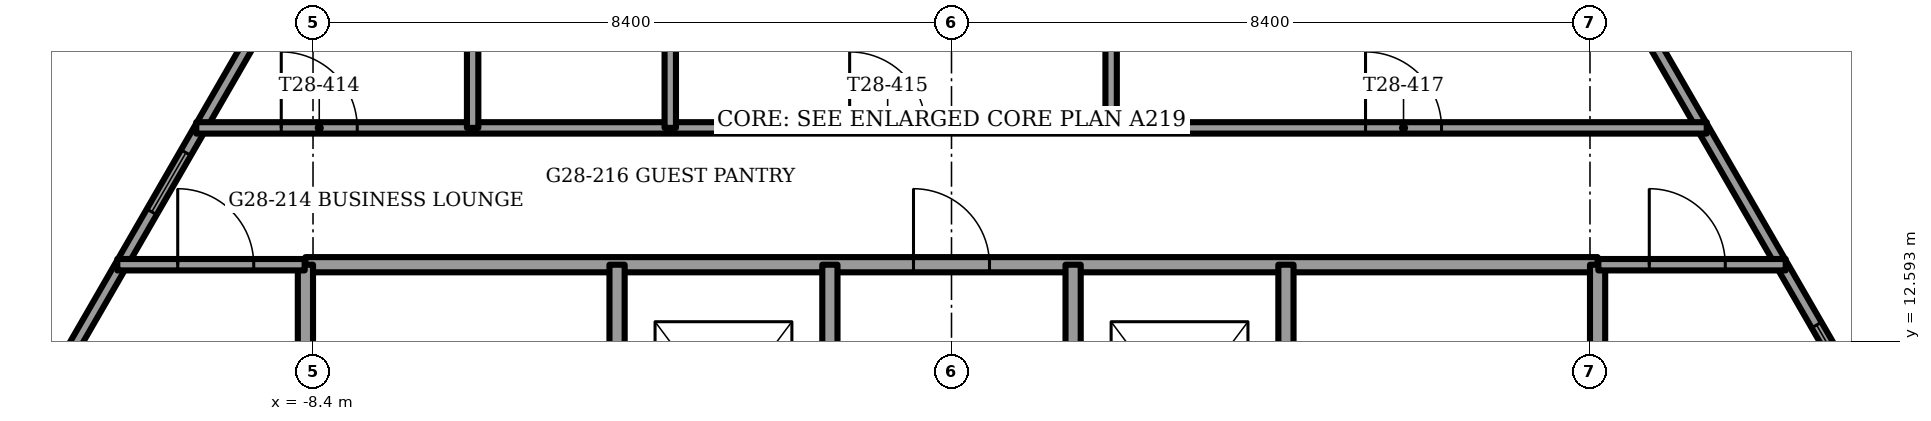
"""IFC4 building model, lengths in metres.
Left out: names, types, materials, properties, quantities, classifications, styles, units other than length and angle.
Written with IfcOpenShell. Run it as: python <this file> out.ifc"""

import sys

from ifc_helpers import new_model, si_unit, direction, frame, frame_2d, origin, place, context, subcontext, project, spatial, rectangle, extrude, element, fill, save


model = new_model("IFC4")
c1 = context("Model", 3, precision=1e-05, world=origin(), true_north=direction((0.0, 1.0)))
c2 = subcontext(c1, "Body", "Model", "MODEL_VIEW")
j1 = project(units=[si_unit("LENGTHUNIT", "METRE"), si_unit("PLANEANGLEUNIT", "RADIAN")], contexts=[c1])
p1 = place(None, origin())
s1 = spatial("IfcSite", under=j1, at=p1, CompositionType="ELEMENT")
p2 = place(p1, origin())
s2 = spatial("IfcBuilding", under=s1, at=p2, CompositionType="ELEMENT")
p3 = place(p2, frame((0.0, 0.0, 116.0)))
s3 = spatial("IfcBuildingStorey", under=s2, at=p3, CompositionType="ELEMENT", Elevation=116.0)
for number, where, z_axis, x_axis in (
    (1, (-11.017, 19.286, 0.0), (0.0, 0.0, 1.0), (-0.5, -0.866, 0.0)),
    (2, (14.376, 13.469, 0.0), (0.0, 0.0, 1.0), (-0.5, 0.866, 0.0)),
):
    element("IfcWall", number, at=place(p3, frame(where, z_axis=z_axis, x_axis=x_axis)), inside=s3, PredefinedType="PARAPET", context=c2, shape_type="SweptSolid", body=[
        extrude(rectangle(XDim=6.717, YDim=0.9, at=frame_2d((3.358, 0.0))), origin(), (0.0, 0.0, 1.0), 1.1),
    ])
p4 = place(p3, frame((-7.925, 18.792, 0.0), z_axis=(0.0, 0.0, 1.0), x_axis=(-0.499994842654, -0.866028381359, 0.0)))
e3 = element("IfcWall", 3, at=p4, inside=s3, PredefinedType="SOLIDWALL", context=c2, shape_type="SweptSolid", body=[
    extrude(rectangle(XDim=21.853, YDim=0.15, at=frame_2d((10.927, 0.0))), origin(), (0.0, 0.0, 1.0), 3.45),
])
p5 = place(p4, frame((4.293, 0.0, 0.15)))
e4 = element("IfcOpeningElement", 4, at=p5, cuts=e3, PredefinedType="OPENING", context=c2, shape_type="SweptSolid", body=[
    extrude(rectangle(XDim=0.9, YDim=2.85, at=frame_2d((0.45, 1.425))), frame((0.0, 0.075, 0.0), z_axis=(0.0, -1.0, 0.0), x_axis=(1.0, 0.0, 0.0)), (0.0, 0.0, 1.0), 0.15),
])
p6 = place(p4, frame((8.412, 0.0, 0.15)))
e5 = element("IfcOpeningElement", 5, at=p6, cuts=e3, PredefinedType="OPENING", context=c2, shape_type="SweptSolid", body=[
    extrude(rectangle(XDim=0.9, YDim=2.85, at=frame_2d((0.45, 1.425))), frame((0.0, 0.075, 0.0), z_axis=(0.0, -1.0, 0.0), x_axis=(1.0, 0.0, 0.0)), (0.0, 0.0, 1.0), 0.15),
])
p7 = place(p4, frame((12.612, 0.0, 0.15)))
e6 = element("IfcOpeningElement", 6, at=p7, cuts=e3, PredefinedType="OPENING", context=c2, shape_type="SweptSolid", body=[
    extrude(rectangle(XDim=1.7, YDim=2.85, at=frame_2d((0.85, 1.425))), frame((0.0, 0.075, 0.0), z_axis=(0.0, -1.0, 0.0), x_axis=(1.0, 0.0, 0.0)), (0.0, 0.0, 1.0), 0.15),
])
p8 = place(p4, frame((14.712, 0.0, 0.15)))
e7 = element("IfcOpeningElement", 7, at=p8, cuts=e3, PredefinedType="OPENING", context=c2, shape_type="SweptSolid", body=[
    extrude(rectangle(XDim=1.5, YDim=2.85, at=frame_2d((0.75, 1.425))), frame((0.0, 0.075, 0.0), z_axis=(0.0, -1.0, 0.0), x_axis=(1.0, 0.0, 0.0)), (0.0, 0.0, 1.0), 0.15),
])
p9 = place(p4, frame((16.812, 0.0, 0.15)))
e8 = element("IfcOpeningElement", 8, at=p9, cuts=e3, PredefinedType="OPENING", context=c2, shape_type="SweptSolid", body=[
    extrude(rectangle(XDim=1.7, YDim=2.85, at=frame_2d((0.85, 1.425))), frame((0.0, 0.075, 0.0), z_axis=(0.0, -1.0, 0.0), x_axis=(1.0, 0.0, 0.0)), (0.0, 0.0, 1.0), 0.15),
])
p10 = place(p4, frame((18.912, 0.0, 0.15)))
e9 = element("IfcOpeningElement", 9, at=p10, cuts=e3, PredefinedType="OPENING", context=c2, shape_type="SweptSolid", body=[
    extrude(rectangle(XDim=1.5, YDim=2.85, at=frame_2d((0.75, 1.425))), frame((0.0, 0.075, 0.0), z_axis=(0.0, -1.0, 0.0), x_axis=(1.0, 0.0, 0.0)), (0.0, 0.0, 1.0), 0.15),
])
p11 = place(p4, frame((1.022, 0.0, 0.15)))
e10 = element("IfcOpeningElement", 10, at=p11, cuts=e3, PredefinedType="OPENING", context=c2, shape_type="SweptSolid", body=[
    extrude(rectangle(XDim=1.7, YDim=2.73, at=frame_2d((0.85, 1.365))), frame((0.0, 0.075, 0.0), z_axis=(0.0, -1.0, 0.0), x_axis=(1.0, 0.0, 0.0)), (0.0, 0.0, 1.0), 0.15),
])
p12 = place(p3, frame((18.852, -0.133, 0.0), z_axis=(0.0, 0.0, 1.0), x_axis=(-0.499994842654, 0.866028381359, 0.0)))
e11 = element("IfcWall", 11, at=p12, inside=s3, PredefinedType="SOLIDWALL", context=c2, shape_type="SweptSolid", body=[
    extrude(rectangle(XDim=21.853, YDim=0.15, at=frame_2d((10.927, 0.0))), origin(), (0.0, 0.0, 1.0), 3.45),
])
p13 = place(p12, frame((1.441, 0.0, 0.15)))
e12 = element("IfcOpeningElement", 12, at=p13, cuts=e11, PredefinedType="OPENING", context=c2, shape_type="SweptSolid", body=[
    extrude(rectangle(XDim=1.7, YDim=2.85, at=frame_2d((0.85, 1.425))), frame((0.0, 0.075, 0.0), z_axis=(0.0, -1.0, 0.0), x_axis=(1.0, 0.0, 0.0)), (0.0, 0.0, 1.0), 0.15),
])
p14 = place(p12, frame((3.541, 0.0, 0.15)))
e13 = element("IfcOpeningElement", 13, at=p14, cuts=e11, PredefinedType="OPENING", context=c2, shape_type="SweptSolid", body=[
    extrude(rectangle(XDim=1.5, YDim=2.85, at=frame_2d((0.75, 1.425))), frame((0.0, 0.075, 0.0), z_axis=(0.0, -1.0, 0.0), x_axis=(1.0, 0.0, 0.0)), (0.0, 0.0, 1.0), 0.15),
])
p15 = place(p12, frame((5.641, 0.0, 0.15)))
e14 = element("IfcOpeningElement", 14, at=p15, cuts=e11, PredefinedType="OPENING", context=c2, shape_type="SweptSolid", body=[
    extrude(rectangle(XDim=1.7, YDim=2.85, at=frame_2d((0.85, 1.425))), frame((0.0, 0.075, 0.0), z_axis=(0.0, -1.0, 0.0), x_axis=(1.0, 0.0, 0.0)), (0.0, 0.0, 1.0), 0.15),
])
p16 = place(p12, frame((7.741, 0.0, 0.15)))
e15 = element("IfcOpeningElement", 15, at=p16, cuts=e11, PredefinedType="OPENING", context=c2, shape_type="SweptSolid", body=[
    extrude(rectangle(XDim=1.5, YDim=2.85, at=frame_2d((0.75, 1.425))), frame((0.0, 0.075, 0.0), z_axis=(0.0, -1.0, 0.0), x_axis=(1.0, 0.0, 0.0)), (0.0, 0.0, 1.0), 0.15),
])
p17 = place(p12, frame((10.531, 0.0, 0.15)))
e16 = element("IfcOpeningElement", 16, at=p17, cuts=e11, PredefinedType="OPENING", context=c2, shape_type="SweptSolid", body=[
    extrude(rectangle(XDim=0.9, YDim=2.85, at=frame_2d((0.45, 1.425))), frame((0.0, 0.075, 0.0), z_axis=(0.0, -1.0, 0.0), x_axis=(1.0, 0.0, 0.0)), (0.0, 0.0, 1.0), 0.15),
])
p18 = place(p12, frame((14.041, 0.0, 0.15)))
e17 = element("IfcOpeningElement", 17, at=p18, cuts=e11, PredefinedType="OPENING", context=c2, shape_type="SweptSolid", body=[
    extrude(rectangle(XDim=0.9, YDim=2.85, at=frame_2d((0.45, 1.425))), frame((0.0, 0.075, 0.0), z_axis=(0.0, -1.0, 0.0), x_axis=(1.0, 0.0, 0.0)), (0.0, 0.0, 1.0), 0.15),
])
p19 = place(p12, frame((19.132, 0.0, 0.15)))
e18 = element("IfcOpeningElement", 18, at=p19, cuts=e11, PredefinedType="OPENING", context=c2, shape_type="SweptSolid", body=[
    extrude(rectangle(XDim=1.7, YDim=2.73, at=frame_2d((0.85, 1.365))), frame((0.0, 0.075, 0.0), z_axis=(0.0, -1.0, 0.0), x_axis=(1.0, 0.0, 0.0)), (0.0, 0.0, 1.0), 0.15),
])
p20 = place(p3, frame((-8.5, 13.6, 0.0), z_axis=(0.0, 0.0, 1.0), x_axis=(1.0, 0.0, 0.0)))
e19 = element("IfcWall", 19, at=p20, inside=s3, PredefinedType="PARTITIONING", context=c2, shape_type="SweptSolid", body=[
    extrude(rectangle(XDim=17.0, YDim=0.2, at=frame_2d((8.5, 0.0))), origin(), (0.0, 0.0, 1.0), 3.45),
])
p21 = place(p20, frame((8.0, 0.0, 0.0)))
e20 = element("IfcOpeningElement", 20, at=p21, cuts=e19, PredefinedType="OPENING", context=c2, shape_type="SweptSolid", body=[
    extrude(rectangle(XDim=1.0, YDim=2.1, at=frame_2d((0.5, 1.05))), frame((0.0, 0.1, 0.0), z_axis=(0.0, -1.0, 0.0), x_axis=(1.0, 0.0, 0.0)), (0.0, 0.0, 1.0), 0.2),
])
p22 = place(p3, frame((-8.5, 9.7, 0.0), z_axis=(0.0, 0.0, 1.0), x_axis=(0.0, 1.0, 0.0)))
e21 = element("IfcWall", 21, at=p22, inside=s3, PredefinedType="PARTITIONING", context=c2, shape_type="SweptSolid", body=[
    extrude(rectangle(XDim=3.9, YDim=0.2, at=frame_2d((1.95, 0.0))), origin(), (0.0, 0.0, 1.0), 3.45),
])
p23 = place(p22, frame((1.35, 0.0, 0.0)))
e22 = element("IfcOpeningElement", 22, at=p23, cuts=e21, PredefinedType="OPENING", context=c2, shape_type="SweptSolid", body=[
    extrude(rectangle(XDim=1.2, YDim=2.1, at=frame_2d((0.6, 1.05))), frame((0.0, 0.1, 0.0), z_axis=(0.0, -1.0, 0.0), x_axis=(1.0, 0.0, 0.0)), (0.0, 0.0, 1.0), 0.2),
])
p24 = place(p3, frame((8.5, 9.7, 0.0), z_axis=(0.0, 0.0, 1.0), x_axis=(0.0, 1.0, 0.0)))
e23 = element("IfcWall", 23, at=p24, inside=s3, PredefinedType="PARTITIONING", context=c2, shape_type="SweptSolid", body=[
    extrude(rectangle(XDim=3.9, YDim=0.2, at=frame_2d((1.95, 0.0))), origin(), (0.0, 0.0, 1.0), 3.45),
])
p25 = place(p24, frame((1.35, 0.0, 0.0)))
e24 = element("IfcOpeningElement", 24, at=p25, cuts=e23, PredefinedType="OPENING", context=c2, shape_type="SweptSolid", body=[
    extrude(rectangle(XDim=1.2, YDim=2.1, at=frame_2d((0.6, 1.05))), frame((0.0, 0.1, 0.0), z_axis=(0.0, -1.0, 0.0), x_axis=(1.0, 0.0, 0.0)), (0.0, 0.0, 1.0), 0.2),
])
p26 = place(p3, frame((-4.4, 9.7, 0.0), z_axis=(0.0, 0.0, 1.0), x_axis=(0.0, 1.0, 0.0)))
e25 = element("IfcWall", 25, at=p26, inside=s3, PredefinedType="PARTITIONING", context=c2, shape_type="SweptSolid", body=[
    extrude(rectangle(XDim=3.9, YDim=0.2, at=frame_2d((1.95, 0.0))), origin(), (0.0, 0.0, 1.0), 3.45),
])
p27 = place(p26, frame((1.35, 0.0, 0.0)))
e26 = element("IfcOpeningElement", 26, at=p27, cuts=e25, PredefinedType="OPENING", context=c2, shape_type="SweptSolid", body=[
    extrude(rectangle(XDim=1.2, YDim=2.1, at=frame_2d((0.6, 1.05))), frame((0.0, 0.1, 0.0), z_axis=(0.0, -1.0, 0.0), x_axis=(1.0, 0.0, 0.0)), (0.0, 0.0, 1.0), 0.2),
])
p28 = place(p3, frame((4.4, 9.7, 0.0), z_axis=(0.0, 0.0, 1.0), x_axis=(0.0, 1.0, 0.0)))
e27 = element("IfcWall", 27, at=p28, inside=s3, PredefinedType="PARTITIONING", context=c2, shape_type="SweptSolid", body=[
    extrude(rectangle(XDim=3.9, YDim=0.2, at=frame_2d((1.95, 0.0))), origin(), (0.0, 0.0, 1.0), 3.45),
])
p29 = place(p28, frame((1.35, 0.0, 0.0)))
e28 = element("IfcOpeningElement", 28, at=p29, cuts=e27, PredefinedType="OPENING", context=c2, shape_type="SweptSolid", body=[
    extrude(rectangle(XDim=1.2, YDim=2.1, at=frame_2d((0.6, 1.05))), frame((0.0, 0.1, 0.0), z_axis=(0.0, -1.0, 0.0), x_axis=(1.0, 0.0, 0.0)), (0.0, 0.0, 1.0), 0.2),
])
for number, where, z_axis, x_axis in (
    (29, (-1.6, 9.7, 0.0), (0.0, 0.0, 1.0), (0.0, 1.0, 0.0)),
    (30, (1.6, 9.7, 0.0), (0.0, 0.0, 1.0), (0.0, 1.0, 0.0)),
):
    element("IfcWall", number, at=place(p3, frame(where, z_axis=z_axis, x_axis=x_axis)), inside=s3, PredefinedType="PARTITIONING", context=c2, shape_type="SweptSolid", body=[
        extrude(rectangle(XDim=3.9, YDim=0.2, at=frame_2d((1.95, 0.0))), origin(), (0.0, 0.0, 1.0), 3.45),
    ])
p30 = place(p3, frame((-10.975, 13.6, 0.0), z_axis=(0.0, 0.0, 1.0), x_axis=(1.0, 0.0, 0.0)))
e31 = element("IfcWall", 31, at=p30, inside=s3, PredefinedType="PARTITIONING", context=c2, shape_type="SweptSolid", body=[
    extrude(rectangle(XDim=2.465, YDim=0.15, at=frame_2d((1.232, 0.0))), origin(), (0.0, 0.0, 1.0), 3.45),
])
p31 = place(p30, frame((0.795, 0.0, 0.0)))
e32 = element("IfcOpeningElement", 32, at=p31, cuts=e31, PredefinedType="OPENING", context=c2, shape_type="SweptSolid", body=[
    extrude(rectangle(XDim=1.0, YDim=2.1, at=frame_2d((0.5, 1.05))), frame((0.0, 0.075, 0.0), z_axis=(0.0, -1.0, 0.0), x_axis=(1.0, 0.0, 0.0)), (0.0, 0.0, 1.0), 0.15),
])
p32 = place(p3, frame((8.51, 13.6, 0.0), z_axis=(0.0, 0.0, 1.0), x_axis=(1.0, 0.0, 0.0)))
e33 = element("IfcWall", 33, at=p32, inside=s3, PredefinedType="PARTITIONING", context=c2, shape_type="SweptSolid", body=[
    extrude(rectangle(XDim=2.465, YDim=0.15, at=frame_2d((1.232, 0.0))), origin(), (0.0, 0.0, 1.0), 3.45),
])
p33 = place(p32, frame((0.67, 0.0, 0.0)))
e34 = element("IfcOpeningElement", 34, at=p33, cuts=e33, PredefinedType="OPENING", context=c2, shape_type="SweptSolid", body=[
    extrude(rectangle(XDim=1.0, YDim=2.1, at=frame_2d((0.5, 1.05))), frame((0.0, 0.075, 0.0), z_axis=(0.0, -1.0, 0.0), x_axis=(1.0, 0.0, 0.0)), (0.0, 0.0, 1.0), 0.15),
])
p34 = place(p3, frame((-9.936, 15.4, 0.0), z_axis=(0.0, 0.0, 1.0), x_axis=(1.0, 0.0, 0.0)))
e35 = element("IfcWall", 35, at=p34, inside=s3, PredefinedType="PARTITIONING", context=c2, shape_type="SweptSolid", body=[
    extrude(rectangle(XDim=19.872, YDim=0.15, at=frame_2d((9.936, 0.0))), origin(), (0.0, 0.0, 1.0), 3.45),
])
p35 = place(p34, frame((1.118, 0.0, 0.0)))
e36 = element("IfcOpeningElement", 36, at=p35, cuts=e35, PredefinedType="OPENING", context=c2, shape_type="SweptSolid", body=[
    extrude(rectangle(XDim=1.0, YDim=2.1, at=frame_2d((0.5, 1.05))), frame((0.0, 0.075, 0.0), z_axis=(0.0, -1.0, 0.0), x_axis=(1.0, 0.0, 0.0)), (0.0, 0.0, 1.0), 0.15),
])
p36 = place(p34, frame((8.596, 0.0, 0.0)))
e37 = element("IfcOpeningElement", 37, at=p36, cuts=e35, PredefinedType="OPENING", context=c2, shape_type="SweptSolid", body=[
    extrude(rectangle(XDim=1.0, YDim=2.1, at=frame_2d((0.5, 1.05))), frame((0.0, 0.075, 0.0), z_axis=(0.0, -1.0, 0.0), x_axis=(1.0, 0.0, 0.0)), (0.0, 0.0, 1.0), 0.15),
])
p37 = place(p34, frame((15.383, 0.0, 0.0)))
e38 = element("IfcOpeningElement", 38, at=p37, cuts=e35, PredefinedType="OPENING", context=c2, shape_type="SweptSolid", body=[
    extrude(rectangle(XDim=1.0, YDim=2.1, at=frame_2d((0.5, 1.05))), frame((0.0, 0.075, 0.0), z_axis=(0.0, -1.0, 0.0), x_axis=(1.0, 0.0, 0.0)), (0.0, 0.0, 1.0), 0.15),
])
p38 = place(p3, frame((2.1, 15.4, 0.0), z_axis=(0.0, 0.0, 1.0), x_axis=(0.0, 1.0, 0.0)))
e39 = element("IfcWall", 39, at=p38, inside=s3, PredefinedType="PARTITIONING", context=c2, shape_type="SweptSolid", body=[
    extrude(rectangle(XDim=3.97, YDim=0.15, at=frame_2d((1.985, 0.0))), origin(), (0.0, 0.0, 1.0), 3.45),
])
p39 = place(p3, frame((-3.7, 15.4, 0.0), z_axis=(0.0, 0.0, 1.0), x_axis=(0.0, 1.0, 0.0)))
e40 = element("IfcWall", 40, at=p39, inside=s3, PredefinedType="PARTITIONING", context=c2, shape_type="SweptSolid", body=[
    extrude(rectangle(XDim=3.2, YDim=0.15, at=frame_2d((1.6, 0.0))), origin(), (0.0, 0.0, 1.0), 3.45),
])
p40 = place(p39, frame((1.15, 0.0, 0.0)))
e41 = element("IfcOpeningElement", 41, at=p40, cuts=e40, PredefinedType="OPENING", context=c2, shape_type="SweptSolid", body=[
    extrude(rectangle(XDim=0.9, YDim=2.1, at=frame_2d((0.45, 1.05))), frame((0.0, 0.075, 0.0), z_axis=(0.0, -1.0, 0.0), x_axis=(1.0, 0.0, 0.0)), (0.0, 0.0, 1.0), 0.15),
])
p41 = place(p3, frame((-6.3, 15.4, 0.0), z_axis=(0.0, 0.0, 1.0), x_axis=(0.0, 1.0, 0.0)))
e42 = element("IfcWall", 42, at=p41, inside=s3, PredefinedType="PARTITIONING", context=c2, shape_type="SweptSolid", body=[
    extrude(rectangle(XDim=3.97, YDim=0.15, at=frame_2d((1.985, 0.0))), origin(), (0.0, 0.0, 1.0), 3.45),
])
p42 = place(p5, origin())
e43 = element("IfcWindow", 43, at=p42, inside=s3, PartitioningType="SINGLE_PANEL", PredefinedType="WINDOW", context=c2, shape_type="SweptSolid", body=[
    extrude(rectangle(XDim=0.9, YDim=2.85, at=frame_2d((0.45, 1.425))), frame((0.0, 0.03, 0.0), z_axis=(0.0, -1.0, 0.0), x_axis=(1.0, 0.0, 0.0)), (0.0, 0.0, 1.0), 0.06),
])
fill(e4, e43)
p43 = place(p18, origin())
e44 = element("IfcWindow", 44, at=p43, inside=s3, PartitioningType="SINGLE_PANEL", PredefinedType="WINDOW", context=c2, shape_type="SweptSolid", body=[
    extrude(rectangle(XDim=0.9, YDim=2.85, at=frame_2d((0.45, 1.425))), frame((0.0, 0.03, 0.0), z_axis=(0.0, -1.0, 0.0), x_axis=(1.0, 0.0, 0.0)), (0.0, 0.0, 1.0), 0.06),
])
fill(e17, e44)
p44 = place(p21, origin())
e45 = element("IfcDoor", 45, at=p44, inside=s3, OperationType="SINGLE_SWING_LEFT", PredefinedType="DOOR", context=c2, shape_type="SweptSolid", body=[
    extrude(rectangle(XDim=1.0, YDim=2.1, at=frame_2d((0.5, 1.05))), frame((0.0, 0.025, 0.0), z_axis=(0.0, -1.0, 0.0), x_axis=(1.0, 0.0, 0.0)), (0.0, 0.0, 1.0), 0.05),
])
fill(e20, e45)
p45 = place(p35, origin())
e46 = element("IfcDoor", 46, at=p45, inside=s3, OperationType="SINGLE_SWING_LEFT", PredefinedType="DOOR", context=c2, shape_type="SweptSolid", body=[
    extrude(rectangle(XDim=1.0, YDim=2.1, at=frame_2d((0.5, 1.05))), frame((0.0, 0.025, 0.0), z_axis=(0.0, -1.0, 0.0), x_axis=(1.0, 0.0, 0.0)), (0.0, 0.0, 1.0), 0.05),
])
fill(e36, e46)
p46 = place(p36, origin())
e47 = element("IfcDoor", 47, at=p46, inside=s3, OperationType="SINGLE_SWING_RIGHT", PredefinedType="DOOR", context=c2, shape_type="SweptSolid", body=[
    extrude(rectangle(XDim=1.0, YDim=2.1, at=frame_2d((0.5, 1.05))), frame((0.0, 0.025, 0.0), z_axis=(0.0, -1.0, 0.0), x_axis=(1.0, 0.0, 0.0)), (0.0, 0.0, 1.0), 0.05),
])
fill(e37, e47)
p47 = place(p37, origin())
e48 = element("IfcDoor", 48, at=p47, inside=s3, OperationType="SINGLE_SWING_LEFT", PredefinedType="DOOR", context=c2, shape_type="SweptSolid", body=[
    extrude(rectangle(XDim=1.0, YDim=2.1, at=frame_2d((0.5, 1.05))), frame((0.0, 0.025, 0.0), z_axis=(0.0, -1.0, 0.0), x_axis=(1.0, 0.0, 0.0)), (0.0, 0.0, 1.0), 0.05),
])
fill(e38, e48)
p48 = place(p31, origin())
e49 = element("IfcDoor", 49, at=p48, inside=s3, OperationType="SINGLE_SWING_RIGHT", PredefinedType="DOOR", context=c2, shape_type="SweptSolid", body=[
    extrude(rectangle(XDim=1.0, YDim=2.1, at=frame_2d((0.5, 1.05))), frame((0.0, 0.025, 0.0), z_axis=(0.0, -1.0, 0.0), x_axis=(1.0, 0.0, 0.0)), (0.0, 0.0, 1.0), 0.05),
])
fill(e32, e49)
p49 = place(p33, origin())
e50 = element("IfcDoor", 50, at=p49, inside=s3, OperationType="SINGLE_SWING_LEFT", PredefinedType="DOOR", context=c2, shape_type="SweptSolid", body=[
    extrude(rectangle(XDim=1.0, YDim=2.1, at=frame_2d((0.5, 1.05))), frame((0.0, 0.025, 0.0), z_axis=(0.0, -1.0, 0.0), x_axis=(1.0, 0.0, 0.0)), (0.0, 0.0, 1.0), 0.05),
])
fill(e34, e50)
save(model, sys.argv[1])
